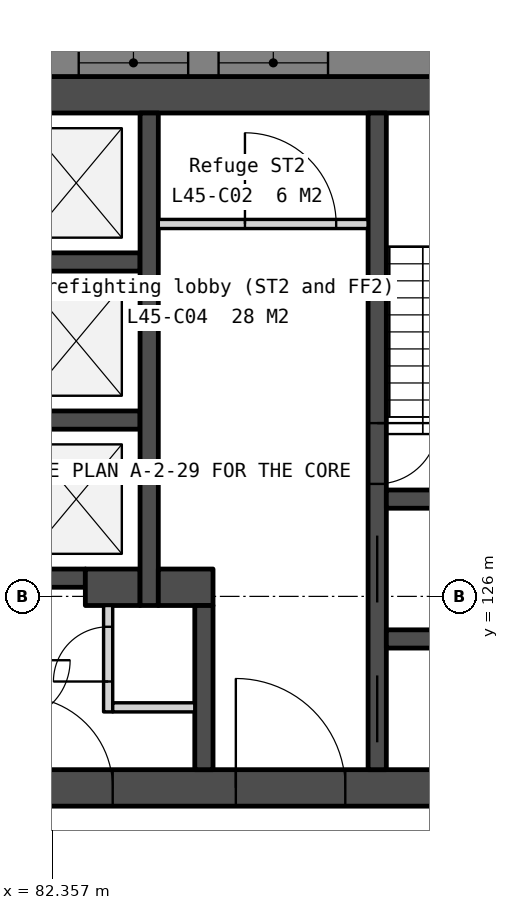
"""IFC4 building model, lengths in metres.
Left out: names, types, materials, properties, quantities, classifications, styles, units other than length and angle.
Written with IfcOpenShell. Run it as: python <this file> out.ifc"""

import sys

from ifc_helpers import new_model, si_unit, direction, frame, frame_2d, origin, place, context, subcontext, project, spatial, polyline, rectangle, outline, extrude, element, fill, save


model = new_model("IFC4")
c1 = context("Model", 3, precision=1e-05, world=origin(), true_north=direction((0.0, 1.0)))
c2 = subcontext(c1, "Body", "Model", "MODEL_VIEW")
j1 = project(units=[si_unit("LENGTHUNIT", "METRE"), si_unit("PLANEANGLEUNIT", "RADIAN")], contexts=[c1])
p1 = place(None, origin())
s1 = spatial("IfcSite", under=j1, at=p1, CompositionType="ELEMENT")
p2 = place(p1, origin())
s2 = spatial("IfcBuilding", under=s1, at=p2, CompositionType="ELEMENT")
p3 = place(p2, frame((0.0, 0.0, 180.2)))
s3 = spatial("IfcBuildingStorey", under=s2, at=p3, CompositionType="ELEMENT", Elevation=180.2)
p4 = place(p3, frame((69.0, 134.25, 0.0), z_axis=(0.0, 0.0, 1.0), x_axis=(1.0, 0.0, 0.0)))
e1 = element("IfcWall", 1, at=p4, inside=s3, PredefinedType="SOLIDWALL", context=c2, shape_type="SweptSolid", body=[
    extrude(rectangle(XDim=22.0, YDim=0.6, at=frame_2d((11.0, 0.0))), origin(), (0.0, 0.0, 1.0), 3.75),
])
p5 = place(p3, frame((69.0, 122.85, 0.0), z_axis=(0.0, 0.0, 1.0), x_axis=(1.0, 0.0, 0.0)))
e2 = element("IfcWall", 2, at=p5, inside=s3, PredefinedType="SOLIDWALL", context=c2, shape_type="SweptSolid", body=[
    extrude(rectangle(XDim=22.0, YDim=0.6, at=frame_2d((11.0, 0.0))), origin(), (0.0, 0.0, 1.0), 3.75),
])
p6 = place(p5, frame((16.375, 0.0, 0.0)))
e3 = element("IfcOpeningElement", 3, at=p6, cuts=e2, PredefinedType="OPENING", context=c2, shape_type="SweptSolid", body=[
    extrude(rectangle(XDim=1.8, YDim=2.1, at=frame_2d((0.9, 1.05))), frame((0.0, 0.31, 0.0), z_axis=(0.0, -1.0, 0.0), x_axis=(1.0, 0.0, 0.0)), (0.0, 0.0, 1.0), 0.62),
])
p7 = place(p5, frame((3.825, 0.0, 0.0)))
e4 = element("IfcOpeningElement", 4, at=p7, cuts=e2, PredefinedType="OPENING", context=c2, shape_type="SweptSolid", body=[
    extrude(rectangle(XDim=1.8, YDim=2.1, at=frame_2d((0.9, 1.05))), frame((0.0, 0.31, 0.0), z_axis=(0.0, -1.0, 0.0), x_axis=(1.0, 0.0, 0.0)), (0.0, 0.0, 1.0), 0.62),
])
p8 = place(p5, frame((12.85, 0.0, 0.0)))
e5 = element("IfcOpeningElement", 5, at=p8, cuts=e2, PredefinedType="OPENING", context=c2, shape_type="SweptSolid", body=[
    extrude(rectangle(XDim=1.5, YDim=2.1, at=frame_2d((0.75, 1.05))), frame((0.0, 0.31, 0.0), z_axis=(0.0, -1.0, 0.0), x_axis=(1.0, 0.0, 0.0)), (0.0, 0.0, 1.0), 0.62),
])
for number, where, z_axis, x_axis in (
    (6, (81.7, 131.5, 0.0), (0.0, 0.0, 1.0), (1.0, 0.0, 0.0)),
    (7, (81.7, 128.9, 0.0), (0.0, 0.0, 1.0), (1.0, 0.0, 0.0)),
):
    element("IfcWall", number, at=place(p3, frame(where, z_axis=z_axis, x_axis=x_axis)), inside=s3, PredefinedType="SOLIDWALL", context=c2, shape_type="SweptSolid", body=[
        extrude(rectangle(XDim=2.1, YDim=0.3, at=frame_2d((1.05, 0.0))), origin(), (0.0, 0.0, 1.0), 3.75),
    ])
p9 = place(p3, frame((81.7, 126.3, 0.0), z_axis=(0.0, 0.0, 1.0), x_axis=(1.0, 0.0, 0.0)))
e8 = element("IfcWall", 8, at=p9, inside=s3, PredefinedType="SOLIDWALL", context=c2, shape_type="SweptSolid", body=[
    extrude(rectangle(XDim=1.2, YDim=0.3, at=frame_2d((0.6, 0.0))), origin(), (0.0, 0.0, 1.0), 3.75),
])
p10 = place(p3, frame((82.9, 126.15, 0.0), z_axis=(0.0, 0.0, 1.0), x_axis=(1.0, 0.0, 0.0)))
e9 = element("IfcWall", 9, at=p10, inside=s3, PredefinedType="SOLIDWALL", context=c2, shape_type="SweptSolid", body=[
    extrude(rectangle(XDim=0.9, YDim=0.6, at=frame_2d((0.45, 0.0))), origin(), (0.0, 0.0, 1.0), 3.75),
])
p11 = place(p3, frame((83.275, 125.85, 0.0), z_axis=(0.0, 0.0, 1.0), x_axis=(0.0, -1.0, 0.0)))
e10 = element("IfcWall", 10, at=p11, inside=s3, PredefinedType="PARTITIONING", context=c2, shape_type="SweptSolid", body=[
    extrude(rectangle(XDim=1.75, YDim=0.15, at=frame_2d((0.875, 0.0))), origin(), (0.0, 0.0, 1.0), 3.75),
])
p12 = place(p11, frame((0.35, 0.0, 0.0)))
e11 = element("IfcOpeningElement", 11, at=p12, cuts=e10, PredefinedType="OPENING", context=c2, shape_type="SweptSolid", body=[
    extrude(rectangle(XDim=0.9, YDim=2.1, at=frame_2d((0.45, 1.05))), frame((0.0, 0.085, 0.0), z_axis=(0.0, -1.0, 0.0), x_axis=(1.0, 0.0, 0.0)), (0.0, 0.0, 1.0), 0.17),
])
p13 = place(p3, frame((83.35, 124.175, 0.0), z_axis=(0.0, 0.0, 1.0), x_axis=(1.0, 0.0, 0.0)))
e12 = element("IfcWall", 12, at=p13, inside=s3, PredefinedType="PARTITIONING", context=c2, shape_type="SweptSolid", body=[
    extrude(rectangle(XDim=1.35, YDim=0.15, at=frame_2d((0.675, 0.0))), origin(), (0.0, 0.0, 1.0), 3.75),
])
p14 = place(p3, frame((83.95, 133.95, 0.0), z_axis=(0.0, 0.0, 1.0), x_axis=(0.0, -1.0, 0.0)))
e13 = element("IfcWall", 13, at=p14, inside=s3, PredefinedType="SOLIDWALL", context=c2, shape_type="SweptSolid", body=[
    extrude(rectangle(XDim=8.1, YDim=0.3, at=frame_2d((4.05, 0.0))), origin(), (0.0, 0.0, 1.0), 3.75),
])
p15 = place(p3, frame((84.1, 132.125, 0.0), z_axis=(0.0, 0.0, 1.0), x_axis=(1.0, 0.0, 0.0)))
e14 = element("IfcWall", 14, at=p15, inside=s3, PredefinedType="PARTITIONING", context=c2, shape_type="SweptSolid", body=[
    extrude(rectangle(XDim=3.45, YDim=0.15, at=frame_2d((1.725, 0.0))), origin(), (0.0, 0.0, 1.0), 3.75),
])
p16 = place(p15, frame((1.425, 0.0, 0.0)))
e15 = element("IfcOpeningElement", 15, at=p16, cuts=e14, PredefinedType="OPENING", context=c2, shape_type="SweptSolid", body=[
    extrude(rectangle(XDim=1.5, YDim=2.1, at=frame_2d((0.75, 1.05))), frame((0.0, 0.085, 0.0), z_axis=(0.0, -1.0, 0.0), x_axis=(1.0, 0.0, 0.0)), (0.0, 0.0, 1.0), 0.17),
])
p17 = place(p3, frame((84.1, 126.15, 0.0), z_axis=(0.0, 0.0, 1.0), x_axis=(1.0, 0.0, 0.0)))
e16 = element("IfcWall", 16, at=p17, inside=s3, PredefinedType="SOLIDWALL", context=c2, shape_type="SweptSolid", body=[
    extrude(rectangle(XDim=0.9, YDim=0.6, at=frame_2d((0.45, 0.0))), origin(), (0.0, 0.0, 1.0), 3.75),
])
p18 = place(p3, frame((84.85, 125.85, 0.0), z_axis=(0.0, 0.0, 1.0), x_axis=(0.0, -1.0, 0.0)))
e17 = element("IfcWall", 17, at=p18, inside=s3, PredefinedType="SOLIDWALL", context=c2, shape_type="SweptSolid", body=[
    extrude(rectangle(XDim=2.7, YDim=0.3, at=frame_2d((1.35, 0.0))), origin(), (0.0, 0.0, 1.0), 3.75),
])
p19 = place(p3, frame((87.7, 133.95, 0.0), z_axis=(0.0, 0.0, 1.0), x_axis=(0.0, -1.0, 0.0)))
e18 = element("IfcWall", 18, at=p19, inside=s3, PredefinedType="SOLIDWALL", context=c2, shape_type="SweptSolid", body=[
    extrude(rectangle(XDim=10.8, YDim=0.3, at=frame_2d((5.4, 0.0))), origin(), (0.0, 0.0, 1.0), 3.75),
])
p20 = place(p19, frame((6.95, 0.0, 0.0)))
e19 = element("IfcOpeningElement", 19, at=p20, cuts=e18, PredefinedType="OPENING", context=c2, shape_type="SweptSolid", body=[
    extrude(rectangle(XDim=1.1, YDim=2.1, at=frame_2d((0.55, 1.05))), frame((0.0, 0.16, 0.0), z_axis=(0.0, -1.0, 0.0), x_axis=(1.0, 0.0, 0.0)), (0.0, 0.0, 1.0), 0.32),
])
p21 = place(p19, frame((5.1, 0.0, 0.0)))
e20 = element("IfcOpeningElement", 20, at=p21, cuts=e18, PredefinedType="OPENING", context=c2, shape_type="SweptSolid", body=[
    extrude(rectangle(XDim=1.0, YDim=2.1, at=frame_2d((0.5, 1.05))), frame((0.0, 0.16, 0.0), z_axis=(0.0, -1.0, 0.0), x_axis=(1.0, 0.0, 0.0)), (0.0, 0.0, 1.0), 0.32),
])
p22 = place(p19, frame((9.25, 0.0, 0.0)))
e21 = element("IfcOpeningElement", 21, at=p22, cuts=e18, PredefinedType="OPENING", context=c2, shape_type="SweptSolid", body=[
    extrude(rectangle(XDim=1.1, YDim=2.1, at=frame_2d((0.55, 1.05))), frame((0.0, 0.16, 0.0), z_axis=(0.0, -1.0, 0.0), x_axis=(1.0, 0.0, 0.0)), (0.0, 0.0, 1.0), 0.32),
])
for number, where, z_axis, x_axis in (
    (22, (87.85, 127.6, 0.0), (0.0, 0.0, 1.0), (1.0, 0.0, 0.0)),
    (23, (87.85, 125.3, 0.0), (0.0, 0.0, 1.0), (1.0, 0.0, 0.0)),
):
    element("IfcWall", number, at=place(p3, frame(where, z_axis=z_axis, x_axis=x_axis)), inside=s3, PredefinedType="SOLIDWALL", context=c2, shape_type="SweptSolid", body=[
        extrude(rectangle(XDim=2.55, YDim=0.3, at=frame_2d((1.275, 0.0))), origin(), (0.0, 0.0, 1.0), 3.75),
    ])
p23 = place(p3, frame((99.365, 134.775, -0.45), z_axis=(0.0, 0.0, 1.0), x_axis=(-1.0, 0.0, 0.0)))
e24 = element("IfcWall", 24, at=p23, inside=s3, PredefinedType="SOLIDWALL", context=c2, shape_type="SweptSolid", body=[
    extrude(outline(polyline([(38.729, 0.0), (38.729, 4.2), (0.0, 4.2), (0.0, 0.0), (38.729, 0.0)])), frame((0.0, 0.225, 0.0), z_axis=(0.0, -1.0, 0.0), x_axis=(1.0, 0.0, 0.0)), (0.0, 0.0, 1.0), 0.45),
])
p24 = place(p23, frame((2.791, 0.0, 1.25)))
e25 = element("IfcOpeningElement", 25, at=p24, cuts=e24, PredefinedType="OPENING", context=c2, shape_type="SweptSolid", body=[
    extrude(rectangle(XDim=1.8, YDim=2.2, at=frame_2d((0.9, 1.1))), frame((0.0, 0.235, 0.0), z_axis=(0.0, -1.0, 0.0), x_axis=(1.0, 0.0, 0.0)), (0.0, 0.0, 1.0), 0.47),
])
p25 = place(p23, frame((5.091, 0.0, 1.25)))
e26 = element("IfcOpeningElement", 26, at=p25, cuts=e24, PredefinedType="OPENING", context=c2, shape_type="SweptSolid", body=[
    extrude(rectangle(XDim=1.8, YDim=2.2, at=frame_2d((0.9, 1.1))), frame((0.0, 0.235, 0.0), z_axis=(0.0, -1.0, 0.0), x_axis=(1.0, 0.0, 0.0)), (0.0, 0.0, 1.0), 0.47),
])
p26 = place(p23, frame((12.473, 0.0, 1.25)))
e27 = element("IfcOpeningElement", 27, at=p26, cuts=e24, PredefinedType="OPENING", context=c2, shape_type="SweptSolid", body=[
    extrude(rectangle(XDim=1.8, YDim=2.2, at=frame_2d((0.9, 1.1))), frame((0.0, 0.235, 0.0), z_axis=(0.0, -1.0, 0.0), x_axis=(1.0, 0.0, 0.0)), (0.0, 0.0, 1.0), 0.47),
])
p27 = place(p23, frame((14.773, 0.0, 1.25)))
e28 = element("IfcOpeningElement", 28, at=p27, cuts=e24, PredefinedType="OPENING", context=c2, shape_type="SweptSolid", body=[
    extrude(rectangle(XDim=1.8, YDim=2.2, at=frame_2d((0.9, 1.1))), frame((0.0, 0.235, 0.0), z_axis=(0.0, -1.0, 0.0), x_axis=(1.0, 0.0, 0.0)), (0.0, 0.0, 1.0), 0.47),
])
p28 = place(p23, frame((22.156, 0.0, 1.25)))
e29 = element("IfcOpeningElement", 29, at=p28, cuts=e24, PredefinedType="OPENING", context=c2, shape_type="SweptSolid", body=[
    extrude(rectangle(XDim=1.8, YDim=2.2, at=frame_2d((0.9, 1.1))), frame((0.0, 0.235, 0.0), z_axis=(0.0, -1.0, 0.0), x_axis=(1.0, 0.0, 0.0)), (0.0, 0.0, 1.0), 0.47),
])
p29 = place(p23, frame((24.456, 0.0, 1.25)))
e30 = element("IfcOpeningElement", 30, at=p29, cuts=e24, PredefinedType="OPENING", context=c2, shape_type="SweptSolid", body=[
    extrude(rectangle(XDim=1.8, YDim=2.2, at=frame_2d((0.9, 1.1))), frame((0.0, 0.235, 0.0), z_axis=(0.0, -1.0, 0.0), x_axis=(1.0, 0.0, 0.0)), (0.0, 0.0, 1.0), 0.47),
])
p30 = place(p23, frame((31.838, 0.0, 1.25)))
e31 = element("IfcOpeningElement", 31, at=p30, cuts=e24, PredefinedType="OPENING", context=c2, shape_type="SweptSolid", body=[
    extrude(rectangle(XDim=1.8, YDim=2.2, at=frame_2d((0.9, 1.1))), frame((0.0, 0.235, 0.0), z_axis=(0.0, -1.0, 0.0), x_axis=(1.0, 0.0, 0.0)), (0.0, 0.0, 1.0), 0.47),
])
p31 = place(p23, frame((34.138, 0.0, 1.25)))
e32 = element("IfcOpeningElement", 32, at=p31, cuts=e24, PredefinedType="OPENING", context=c2, shape_type="SweptSolid", body=[
    extrude(rectangle(XDim=1.8, YDim=2.2, at=frame_2d((0.9, 1.1))), frame((0.0, 0.235, 0.0), z_axis=(0.0, -1.0, 0.0), x_axis=(1.0, 0.0, 0.0)), (0.0, 0.0, 1.0), 0.47),
])
p32 = place(p3, frame((81.505, 98.627, -0.45), z_axis=(0.0, 0.0, 1.0), x_axis=(0.500002199942, 0.866024133644, 0.0)))
e33 = element("IfcWall", 33, at=p32, inside=s3, PredefinedType="SOLIDWALL", context=c2, shape_type="SweptSolid", body=[
    extrude(outline(polyline([(38.729, 0.0), (38.729, 4.2), (0.0, 4.2), (0.0, 0.0), (38.729, 0.0)])), frame((0.0, 0.225, 0.0), z_axis=(0.0, -1.0, 0.0), x_axis=(1.0, 0.0, 0.0)), (0.0, 0.0, 1.0), 0.45),
])
p33 = place(p32, frame((2.791, 0.0, 1.25)))
e34 = element("IfcOpeningElement", 34, at=p33, cuts=e33, PredefinedType="OPENING", context=c2, shape_type="SweptSolid", body=[
    extrude(rectangle(XDim=1.8, YDim=2.2, at=frame_2d((0.9, 1.1))), frame((0.0, 0.235, 0.0), z_axis=(0.0, -1.0, 0.0), x_axis=(1.0, 0.0, 0.0)), (0.0, 0.0, 1.0), 0.47),
])
p34 = place(p32, frame((5.091, 0.0, 1.25)))
e35 = element("IfcOpeningElement", 35, at=p34, cuts=e33, PredefinedType="OPENING", context=c2, shape_type="SweptSolid", body=[
    extrude(rectangle(XDim=1.8, YDim=2.2, at=frame_2d((0.9, 1.1))), frame((0.0, 0.235, 0.0), z_axis=(0.0, -1.0, 0.0), x_axis=(1.0, 0.0, 0.0)), (0.0, 0.0, 1.0), 0.47),
])
p35 = place(p32, frame((12.473, 0.0, 1.25)))
e36 = element("IfcOpeningElement", 36, at=p35, cuts=e33, PredefinedType="OPENING", context=c2, shape_type="SweptSolid", body=[
    extrude(rectangle(XDim=1.8, YDim=2.2, at=frame_2d((0.9, 1.1))), frame((0.0, 0.235, 0.0), z_axis=(0.0, -1.0, 0.0), x_axis=(1.0, 0.0, 0.0)), (0.0, 0.0, 1.0), 0.47),
])
p36 = place(p32, frame((14.773, 0.0, 1.25)))
e37 = element("IfcOpeningElement", 37, at=p36, cuts=e33, PredefinedType="OPENING", context=c2, shape_type="SweptSolid", body=[
    extrude(rectangle(XDim=1.8, YDim=2.2, at=frame_2d((0.9, 1.1))), frame((0.0, 0.235, 0.0), z_axis=(0.0, -1.0, 0.0), x_axis=(1.0, 0.0, 0.0)), (0.0, 0.0, 1.0), 0.47),
])
p37 = place(p32, frame((22.156, 0.0, 1.25)))
e38 = element("IfcOpeningElement", 38, at=p37, cuts=e33, PredefinedType="OPENING", context=c2, shape_type="SweptSolid", body=[
    extrude(rectangle(XDim=1.8, YDim=2.2, at=frame_2d((0.9, 1.1))), frame((0.0, 0.235, 0.0), z_axis=(0.0, -1.0, 0.0), x_axis=(1.0, 0.0, 0.0)), (0.0, 0.0, 1.0), 0.47),
])
p38 = place(p32, frame((24.456, 0.0, 1.25)))
e39 = element("IfcOpeningElement", 39, at=p38, cuts=e33, PredefinedType="OPENING", context=c2, shape_type="SweptSolid", body=[
    extrude(rectangle(XDim=1.8, YDim=2.2, at=frame_2d((0.9, 1.1))), frame((0.0, 0.235, 0.0), z_axis=(0.0, -1.0, 0.0), x_axis=(1.0, 0.0, 0.0)), (0.0, 0.0, 1.0), 0.47),
])
p39 = place(p32, frame((31.838, 0.0, 1.25)))
e40 = element("IfcOpeningElement", 40, at=p39, cuts=e33, PredefinedType="OPENING", context=c2, shape_type="SweptSolid", body=[
    extrude(rectangle(XDim=1.8, YDim=2.2, at=frame_2d((0.9, 1.1))), frame((0.0, 0.235, 0.0), z_axis=(0.0, -1.0, 0.0), x_axis=(1.0, 0.0, 0.0)), (0.0, 0.0, 1.0), 0.47),
])
p40 = place(p32, frame((34.138, 0.0, 1.25)))
e41 = element("IfcOpeningElement", 41, at=p40, cuts=e33, PredefinedType="OPENING", context=c2, shape_type="SweptSolid", body=[
    extrude(rectangle(XDim=1.8, YDim=2.2, at=frame_2d((0.9, 1.1))), frame((0.0, 0.235, 0.0), z_axis=(0.0, -1.0, 0.0), x_axis=(1.0, 0.0, 0.0)), (0.0, 0.0, 1.0), 0.47),
])
p41 = place(p20, origin())
e42 = element("IfcDoor", 42, at=p41, inside=s3, OperationType="SLIDING_TO_LEFT", PredefinedType="DOOR", context=c2, shape_type="SweptSolid", body=[
    extrude(rectangle(XDim=1.1, YDim=2.1, at=frame_2d((0.55, 1.05))), frame((0.0, 0.025, 0.0), z_axis=(0.0, -1.0, 0.0), x_axis=(1.0, 0.0, 0.0)), (0.0, 0.0, 1.0), 0.05),
])
fill(e19, e42)
p42 = place(p6, origin())
e43 = element("IfcDoor", 43, at=p42, inside=s3, OperationType="DOUBLE_DOOR_DOUBLE_SWING", PredefinedType="DOOR", context=c2, shape_type="SweptSolid", body=[
    extrude(rectangle(XDim=1.8, YDim=2.1, at=frame_2d((0.9, 1.05))), frame((0.0, 0.025, 0.0), z_axis=(0.0, -1.0, 0.0), x_axis=(1.0, 0.0, 0.0)), (0.0, 0.0, 1.0), 0.05),
])
fill(e3, e43)
p43 = place(p8, origin())
e44 = element("IfcDoor", 44, at=p43, inside=s3, OperationType="DOUBLE_DOOR_DOUBLE_SWING", PredefinedType="DOOR", context=c2, shape_type="SweptSolid", body=[
    extrude(rectangle(XDim=1.5, YDim=2.1, at=frame_2d((0.75, 1.05))), frame((0.0, 0.025, 0.0), z_axis=(0.0, -1.0, 0.0), x_axis=(1.0, 0.0, 0.0)), (0.0, 0.0, 1.0), 0.05),
])
fill(e5, e44)
p44 = place(p12, origin())
e45 = element("IfcDoor", 45, at=p44, inside=s3, OperationType="SINGLE_SWING_RIGHT", PredefinedType="DOOR", context=c2, shape_type="SweptSolid", body=[
    extrude(rectangle(XDim=0.9, YDim=2.1, at=frame_2d((0.45, 1.05))), frame((0.0, 0.025, 0.0), z_axis=(0.0, -1.0, 0.0), x_axis=(1.0, 0.0, 0.0)), (0.0, 0.0, 1.0), 0.05),
])
fill(e11, e45)
p45 = place(p16, origin())
e46 = element("IfcDoor", 46, at=p45, inside=s3, OperationType="DOUBLE_DOOR_DOUBLE_SWING", PredefinedType="DOOR", context=c2, shape_type="SweptSolid", body=[
    extrude(rectangle(XDim=1.5, YDim=2.1, at=frame_2d((0.75, 1.05))), frame((0.0, 0.025, 0.0), z_axis=(0.0, -1.0, 0.0), x_axis=(1.0, 0.0, 0.0)), (0.0, 0.0, 1.0), 0.05),
])
fill(e15, e46)
p46 = place(p21, origin())
e47 = element("IfcDoor", 47, at=p46, inside=s3, OperationType="SINGLE_SWING_LEFT", PredefinedType="DOOR", context=c2, shape_type="SweptSolid", body=[
    extrude(rectangle(XDim=1.0, YDim=2.1, at=frame_2d((0.5, 1.05))), frame((0.0, 0.025, 0.0), z_axis=(0.0, -1.0, 0.0), x_axis=(1.0, 0.0, 0.0)), (0.0, 0.0, 1.0), 0.05),
])
fill(e20, e47)
p47 = place(p22, origin())
e48 = element("IfcDoor", 48, at=p47, inside=s3, OperationType="SLIDING_TO_LEFT", PredefinedType="DOOR", context=c2, shape_type="SweptSolid", body=[
    extrude(rectangle(XDim=1.1, YDim=2.1, at=frame_2d((0.55, 1.05))), frame((0.0, 0.025, 0.0), z_axis=(0.0, -1.0, 0.0), x_axis=(1.0, 0.0, 0.0)), (0.0, 0.0, 1.0), 0.05),
])
fill(e21, e48)
p48 = place(p26, origin())
e49 = element("IfcWindow", 49, at=p48, inside=s3, PartitioningType="SINGLE_PANEL", PredefinedType="WINDOW", context=c2, shape_type="SweptSolid", body=[
    extrude(rectangle(XDim=1.8, YDim=2.2, at=frame_2d((0.9, 1.1))), frame((0.0, 0.03, 0.0), z_axis=(0.0, -1.0, 0.0), x_axis=(1.0, 0.0, 0.0)), (0.0, 0.0, 1.0), 0.06),
])
fill(e27, e49)
p49 = place(p27, origin())
e50 = element("IfcWindow", 50, at=p49, inside=s3, PartitioningType="SINGLE_PANEL", PredefinedType="WINDOW", context=c2, shape_type="SweptSolid", body=[
    extrude(rectangle(XDim=1.8, YDim=2.2, at=frame_2d((0.9, 1.1))), frame((0.0, 0.03, 0.0), z_axis=(0.0, -1.0, 0.0), x_axis=(1.0, 0.0, 0.0)), (0.0, 0.0, 1.0), 0.06),
])
fill(e28, e50)
save(model, sys.argv[1])
